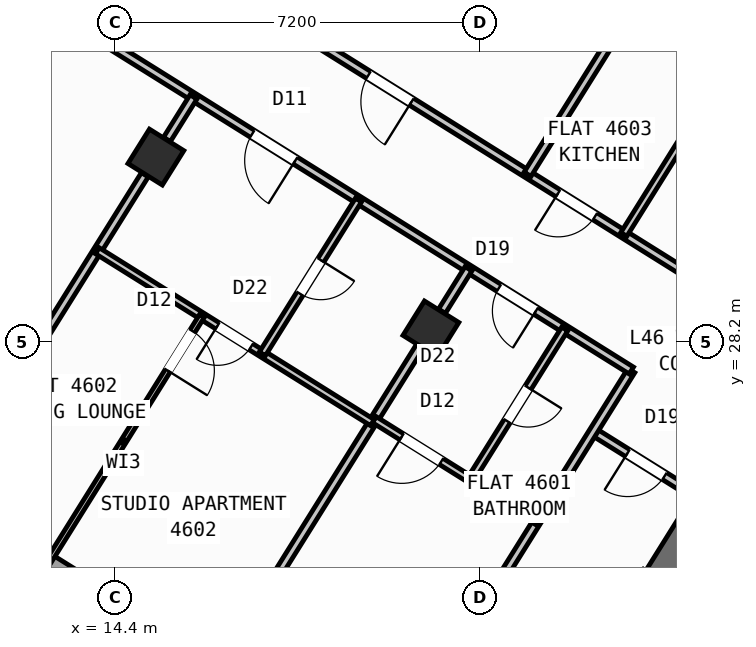
"""IFC4 building model, lengths in metres.
Left out: names, types, materials, properties, quantities, classifications, styles, units other than length and angle.
Written with IfcOpenShell. Run it as: python <this file> out.ifc"""

import sys

from ifc_helpers import new_model, si_unit, direction, frame, frame_2d, origin, origin_2d, place, context, subcontext, project, spatial, rectangle, hollow_rectangle, extrude, source, transform, mapped, element, fill, save


model = new_model("IFC4")
c1 = context("Model", 3, precision=1e-05, world=origin(), true_north=direction((0.0, 1.0)))
c2 = subcontext(c1, "Body", "Model", "MODEL_VIEW")
j1 = project(units=[si_unit("LENGTHUNIT", "METRE"), si_unit("PLANEANGLEUNIT", "RADIAN")], contexts=[c1])
p1 = place(None, origin())
s1 = spatial("IfcSite", under=j1, at=p1, CompositionType="ELEMENT")
p2 = place(p1, origin())
s2 = spatial("IfcBuilding", under=s1, at=p2, CompositionType="ELEMENT")
p3 = place(p2, frame((0.0, 0.0, 184.2)))
s3 = spatial("IfcBuildingStorey", under=s2, at=p3, CompositionType="ELEMENT", Elevation=184.2)
p4 = place(p3, frame((26.007, 24.976, 0.0), z_axis=(0.0, 0.0, 1.0), x_axis=(-0.529923795287, -0.848045264823, 0.0)))
e1 = element("IfcWall", 1, at=p4, inside=s3, PredefinedType="SHEAR", context=c2, shape_type="SweptSolid", body=[
    extrude(rectangle(XDim=6.425, YDim=0.55, at=frame_2d((3.212, 0.0))), origin(), (0.0, 0.0, 1.0), 3.35),
])
m1 = source(origin(), c2, "Body", "SweptSolid", [
    extrude(hollow_rectangle(XDim=0.8, YDim=0.8, WallThickness=0.032, at=origin_2d()), origin(), (0.0, 0.0, 1.0), 3.6),
])
for number, where, z_axis, x_axis in (
    (2, (20.632, 28.452, 0.0), (0.0, 0.0, 1.0), (-0.848, 0.53, 0.0)),
    (3, (15.205, 31.844, 0.0), (0.0, 0.0, 1.0), (-0.848, 0.53, 0.0)),
):
    element("IfcColumn", number, at=place(p3, frame(where, z_axis=z_axis, x_axis=x_axis)), inside=s3, PredefinedType="COLUMN", context=c2, shape_type="MappedRepresentation", body=[
        mapped(m1, transform((0.0, 0.0, 0.0), scale=1.0)),
    ])
p5 = place(p3, frame((31.76, 12.183, 0.0), z_axis=(0.0, 0.0, 1.0), x_axis=(-0.848047074256, 0.529920899612, 0.0)))
e4 = element("IfcWall", 4, at=p5, inside=s3, PredefinedType="STANDARD", context=c2, shape_type="SweptSolid", body=[
    extrude(rectangle(XDim=30.652, YDim=0.32, at=frame_2d((15.326, 0.0))), origin(), (0.0, 0.0, 1.0), 3.35),
])
p6 = place(p5, frame((15.166, 0.0, 0.0)))
e5 = element("IfcOpeningElement", 5, at=p6, cuts=e4, PredefinedType="OPENING", context=c2, shape_type="SweptSolid", body=[
    extrude(rectangle(XDim=1.2, YDim=2.15, at=frame_2d((0.6, 1.075))), frame((0.0, 0.17, 0.0), z_axis=(0.0, -1.0, 0.0), x_axis=(1.0, 0.0, 0.0)), (0.0, 0.0, 1.0), 0.34),
])
p7 = place(p5, frame((2.015, 0.0, 0.8)))
e6 = element("IfcOpeningElement", 6, at=p7, cuts=e4, PredefinedType="OPENING", context=c2, shape_type="SweptSolid", body=[
    extrude(rectangle(XDim=2.1, YDim=1.55, at=frame_2d((1.05, 0.775))), frame((0.0, 0.17, 0.0), z_axis=(0.0, -1.0, 0.0), x_axis=(1.0, 0.0, 0.0)), (0.0, 0.0, 1.0), 0.34),
])
p8 = place(p5, frame((7.244, 0.0, 0.8)))
e7 = element("IfcOpeningElement", 7, at=p8, cuts=e4, PredefinedType="OPENING", context=c2, shape_type="SweptSolid", body=[
    extrude(rectangle(XDim=2.1, YDim=1.55, at=frame_2d((1.05, 0.775))), frame((0.0, 0.17, 0.0), z_axis=(0.0, -1.0, 0.0), x_axis=(1.0, 0.0, 0.0)), (0.0, 0.0, 1.0), 0.34),
])
p9 = place(p5, frame((12.623, 0.0, 1.0)))
e8 = element("IfcOpeningElement", 8, at=p9, cuts=e4, PredefinedType="OPENING", context=c2, shape_type="SweptSolid", body=[
    extrude(rectangle(XDim=0.9, YDim=1.25, at=frame_2d((0.45, 0.625))), frame((0.0, 0.17, 0.0), z_axis=(0.0, -1.0, 0.0), x_axis=(1.0, 0.0, 0.0)), (0.0, 0.0, 1.0), 0.34),
])
p10 = place(p5, frame((19.565, 0.0, 0.95)))
e9 = element("IfcOpeningElement", 9, at=p10, cuts=e4, PredefinedType="OPENING", context=c2, shape_type="SweptSolid", body=[
    extrude(rectangle(XDim=1.2, YDim=1.4, at=frame_2d((0.6, 0.7))), frame((0.0, 0.17, 0.0), z_axis=(0.0, -1.0, 0.0), x_axis=(1.0, 0.0, 0.0)), (0.0, 0.0, 1.0), 0.34),
])
p11 = place(p5, frame((25.983, 0.0, 1.0)))
e10 = element("IfcOpeningElement", 10, at=p11, cuts=e4, PredefinedType="OPENING", context=c2, shape_type="SweptSolid", body=[
    extrude(rectangle(XDim=0.9, YDim=1.25, at=frame_2d((0.45, 0.625))), frame((0.0, 0.17, 0.0), z_axis=(0.0, -1.0, 0.0), x_axis=(1.0, 0.0, 0.0)), (0.0, 0.0, 1.0), 0.34),
])
p12 = place(p5, frame((28.433, 0.0, 1.0)))
e11 = element("IfcOpeningElement", 11, at=p12, cuts=e4, PredefinedType="OPENING", context=c2, shape_type="SweptSolid", body=[
    extrude(rectangle(XDim=0.9, YDim=1.25, at=frame_2d((0.45, 0.625))), frame((0.0, 0.17, 0.0), z_axis=(0.0, -1.0, 0.0), x_axis=(1.0, 0.0, 0.0)), (0.0, 0.0, 1.0), 0.34),
])
p13 = place(p3, frame((5.7, 28.71, 0.0), z_axis=(0.0, 0.0, 1.0), x_axis=(0.529923711467, 0.8480453172, 0.0)))
e12 = element("IfcWall", 12, at=p13, inside=s3, PredefinedType="STANDARD", context=c2, shape_type="SweptSolid", body=[
    extrude(rectangle(XDim=21.587, YDim=0.32, at=frame_2d((10.794, 0.0))), origin(), (0.0, 0.0, 1.0), 2.825),
])
p14 = place(p13, frame((1.44, 0.0, 0.95)))
e13 = element("IfcOpeningElement", 13, at=p14, cuts=e12, PredefinedType="OPENING", context=c2, shape_type="SweptSolid", body=[
    extrude(rectangle(XDim=1.2, YDim=1.4, at=frame_2d((0.6, 0.7))), frame((0.0, 0.17, 0.0), z_axis=(0.0, -1.0, 0.0), x_axis=(1.0, 0.0, 0.0)), (0.0, 0.0, 1.0), 0.34),
])
p15 = place(p13, frame((4.545, 0.0, 0.85)))
e14 = element("IfcOpeningElement", 14, at=p15, cuts=e12, PredefinedType="OPENING", context=c2, shape_type="SweptSolid", body=[
    extrude(rectangle(XDim=1.8, YDim=1.5, at=frame_2d((0.9, 0.75))), frame((0.0, 0.17, 0.0), z_axis=(0.0, -1.0, 0.0), x_axis=(1.0, 0.0, 0.0)), (0.0, 0.0, 1.0), 0.34),
])
p16 = place(p13, frame((12.139, 0.0, 1.0)))
e15 = element("IfcOpeningElement", 15, at=p16, cuts=e12, PredefinedType="OPENING", context=c2, shape_type="SweptSolid", body=[
    extrude(rectangle(XDim=0.9, YDim=1.25, at=frame_2d((0.45, 0.625))), frame((0.0, 0.17, 0.0), z_axis=(0.0, -1.0, 0.0), x_axis=(1.0, 0.0, 0.0)), (0.0, 0.0, 1.0), 0.34),
])
p17 = place(p13, frame((16.35, 0.0, 0.95)))
e16 = element("IfcOpeningElement", 16, at=p17, cuts=e12, PredefinedType="OPENING", context=c2, shape_type="SweptSolid", body=[
    extrude(rectangle(XDim=1.2, YDim=1.4, at=frame_2d((0.6, 0.7))), frame((0.0, 0.17, 0.0), z_axis=(0.0, -1.0, 0.0), x_axis=(1.0, 0.0, 0.0)), (0.0, 0.0, 1.0), 0.34),
])
p18 = place(p13, frame((18.762, 0.0, 0.95)))
e17 = element("IfcOpeningElement", 17, at=p18, cuts=e12, PredefinedType="OPENING", context=c2, shape_type="SweptSolid", body=[
    extrude(rectangle(XDim=1.2, YDim=1.4, at=frame_2d((0.6, 0.7))), frame((0.0, 0.17, 0.0), z_axis=(0.0, -1.0, 0.0), x_axis=(1.0, 0.0, 0.0)), (0.0, 0.0, 1.0), 0.34),
])
p19 = place(p3, frame((17.424, 47.083, 0.0), z_axis=(0.0, 0.0, 1.0), x_axis=(0.848049927979, -0.529916332693, 0.0)))
e18 = element("IfcWall", 18, at=p19, inside=s3, PredefinedType="STANDARD", context=c2, shape_type="SweptSolid", body=[
    extrude(rectangle(XDim=29.223, YDim=0.32, at=frame_2d((14.612, 0.0))), origin(), (0.0, 0.0, 1.0), 3.35),
])
p20 = place(p19, frame((3.764, 0.0, 0.0)))
e19 = element("IfcOpeningElement", 19, at=p20, cuts=e18, PredefinedType="OPENING", context=c2, shape_type="SweptSolid", body=[
    extrude(rectangle(XDim=1.05, YDim=2.15, at=frame_2d((0.525, 1.075))), frame((0.0, 0.17, 0.0), z_axis=(0.0, -1.0, 0.0), x_axis=(1.0, 0.0, 0.0)), (0.0, 0.0, 1.0), 0.34),
])
p21 = place(p19, frame((8.344, 0.0, 0.8)))
e20 = element("IfcOpeningElement", 20, at=p21, cuts=e18, PredefinedType="OPENING", context=c2, shape_type="SweptSolid", body=[
    extrude(rectangle(XDim=2.1, YDim=1.55, at=frame_2d((1.05, 0.775))), frame((0.0, 0.17, 0.0), z_axis=(0.0, -1.0, 0.0), x_axis=(1.0, 0.0, 0.0)), (0.0, 0.0, 1.0), 0.34),
])
p22 = place(p19, frame((13.589, 0.0, 0.85)))
e21 = element("IfcOpeningElement", 21, at=p22, cuts=e18, PredefinedType="OPENING", context=c2, shape_type="SweptSolid", body=[
    extrude(rectangle(XDim=1.8, YDim=1.5, at=frame_2d((0.9, 0.75))), frame((0.0, 0.17, 0.0), z_axis=(0.0, -1.0, 0.0), x_axis=(1.0, 0.0, 0.0)), (0.0, 0.0, 1.0), 0.34),
])
p23 = place(p19, frame((17.104, 0.0, 0.95)))
e22 = element("IfcOpeningElement", 22, at=p23, cuts=e18, PredefinedType="OPENING", context=c2, shape_type="SweptSolid", body=[
    extrude(rectangle(XDim=1.2, YDim=1.4, at=frame_2d((0.6, 0.7))), frame((0.0, 0.17, 0.0), z_axis=(0.0, -1.0, 0.0), x_axis=(1.0, 0.0, 0.0)), (0.0, 0.0, 1.0), 0.34),
])
p24 = place(p19, frame((21.214, 0.0, 0.95)))
e23 = element("IfcOpeningElement", 23, at=p24, cuts=e18, PredefinedType="OPENING", context=c2, shape_type="SweptSolid", body=[
    extrude(rectangle(XDim=1.2, YDim=1.4, at=frame_2d((0.6, 0.7))), frame((0.0, 0.17, 0.0), z_axis=(0.0, -1.0, 0.0), x_axis=(1.0, 0.0, 0.0)), (0.0, 0.0, 1.0), 0.34),
])
p25 = place(p19, frame((25.853, 0.0, 0.95)))
e24 = element("IfcOpeningElement", 24, at=p25, cuts=e18, PredefinedType="OPENING", context=c2, shape_type="SweptSolid", body=[
    extrude(rectangle(XDim=1.2, YDim=1.4, at=frame_2d((0.6, 0.7))), frame((0.0, 0.17, 0.0), z_axis=(0.0, -1.0, 0.0), x_axis=(1.0, 0.0, 0.0)), (0.0, 0.0, 1.0), 0.34),
])
p26 = place(p3, frame((26.049, 25.044, 0.0), z_axis=(0.0, 0.0, 1.0), x_axis=(-0.848050851465, 0.529914854792, 0.0)))
e25 = element("IfcWall", 25, at=p26, inside=s3, PredefinedType="PARTITIONING", context=c2, shape_type="SweptSolid", body=[
    extrude(rectangle(XDim=2.61, YDim=0.16, at=frame_2d((1.305, 0.0))), origin(), (0.0, 0.0, 1.0), 2.825),
])
p27 = place(p26, frame((0.95, 0.0, 0.0)))
e26 = element("IfcOpeningElement", 26, at=p27, cuts=e25, PredefinedType="OPENING", context=c2, shape_type="SweptSolid", body=[
    extrude(rectangle(XDim=0.86, YDim=2.05, at=frame_2d((0.43, 1.025))), frame((0.0, 0.09, 0.0), z_axis=(0.0, -1.0, 0.0), x_axis=(1.0, 0.0, 0.0)), (0.0, 0.0, 1.0), 0.18),
])
p28 = place(p3, frame((24.588, 27.631, 0.0), z_axis=(0.0, 0.0, 1.0), x_axis=(-0.529914992377, -0.848050765494, 0.0)))
e27 = element("IfcWall", 27, at=p28, inside=s3, PredefinedType="PARTITIONING", context=c2, shape_type="SweptSolid", body=[
    extrude(rectangle(XDim=9.15, YDim=0.16, at=frame_2d((4.575, 0.0))), origin(), (0.0, 0.0, 1.0), 3.34),
])
p29 = place(p3, frame((25.754, 29.497, 0.0), z_axis=(0.0, 0.0, 1.0), x_axis=(-0.848045850158, 0.529922858565, 0.0)))
e28 = element("IfcWall", 28, at=p29, inside=s3, PredefinedType="PARTITIONING", context=c2, shape_type="SweptSolid", body=[
    extrude(rectangle(XDim=16.73, YDim=0.16, at=frame_2d((8.365, 0.0))), origin(), (0.0, 0.0, 1.0), 3.34),
])
p30 = place(p29, frame((2.22, 0.0, 0.0)))
e29 = element("IfcOpeningElement", 29, at=p30, cuts=e28, PredefinedType="OPENING", context=c2, shape_type="SweptSolid", body=[
    extrude(rectangle(XDim=0.86, YDim=2.05, at=frame_2d((0.43, 1.025))), frame((0.0, 0.09, 0.0), z_axis=(0.0, -1.0, 0.0), x_axis=(1.0, 0.0, 0.0)), (0.0, 0.0, 1.0), 0.18),
])
p31 = place(p29, frame((6.49, 0.0, 0.0)))
e30 = element("IfcOpeningElement", 30, at=p31, cuts=e28, PredefinedType="OPENING", context=c2, shape_type="SweptSolid", body=[
    extrude(rectangle(XDim=1.0, YDim=2.1, at=frame_2d((0.5, 1.05))), frame((0.0, 0.09, 0.0), z_axis=(0.0, -1.0, 0.0), x_axis=(1.0, 0.0, 0.0)), (0.0, 0.0, 1.0), 0.18),
])
p32 = place(p29, frame((14.304, 0.0, 0.0)))
e31 = element("IfcOpeningElement", 31, at=p32, cuts=e28, PredefinedType="OPENING", context=c2, shape_type="SweptSolid", body=[
    extrude(rectangle(XDim=1.0, YDim=2.1, at=frame_2d((0.5, 1.05))), frame((0.0, 0.09, 0.0), z_axis=(0.0, -1.0, 0.0), x_axis=(1.0, 0.0, 0.0)), (0.0, 0.0, 1.0), 0.18),
])
p33 = place(p3, frame((24.588, 27.631, 0.0), z_axis=(0.0, 0.0, 1.0), x_axis=(-0.848041752158, 0.529929416617, 0.0)))
e32 = element("IfcWall", 32, at=p33, inside=s3, PredefinedType="PARTITIONING", context=c2, shape_type="SweptSolid", body=[
    extrude(rectangle(XDim=16.73, YDim=0.16, at=frame_2d((8.365, 0.0))), origin(), (0.0, 0.0, 1.0), 3.34),
])
p34 = place(p33, frame((2.22, 0.0, 0.0)))
e33 = element("IfcOpeningElement", 33, at=p34, cuts=e32, PredefinedType="OPENING", context=c2, shape_type="SweptSolid", body=[
    extrude(rectangle(XDim=0.86, YDim=2.05, at=frame_2d((0.43, 1.025))), frame((0.0, 0.09, 0.0), z_axis=(0.0, -1.0, 0.0), x_axis=(1.0, 0.0, 0.0)), (0.0, 0.0, 1.0), 0.18),
])
p35 = place(p33, frame((7.82, 0.0, 0.0)))
e34 = element("IfcOpeningElement", 34, at=p35, cuts=e32, PredefinedType="OPENING", context=c2, shape_type="SweptSolid", body=[
    extrude(rectangle(XDim=1.0, YDim=2.1, at=frame_2d((0.5, 1.05))), frame((0.0, 0.09, 0.0), z_axis=(0.0, -1.0, 0.0), x_axis=(1.0, 0.0, 0.0)), (0.0, 0.0, 1.0), 0.18),
])
p36 = place(p33, frame((12.95, 0.0, 0.0)))
e35 = element("IfcOpeningElement", 35, at=p36, cuts=e32, PredefinedType="OPENING", context=c2, shape_type="SweptSolid", body=[
    extrude(rectangle(XDim=1.0, YDim=2.1, at=frame_2d((0.5, 1.05))), frame((0.0, 0.09, 0.0), z_axis=(0.0, -1.0, 0.0), x_axis=(1.0, 0.0, 0.0)), (0.0, 0.0, 1.0), 0.18),
])
p37 = place(p3, frame((21.374, 29.639, 0.0), z_axis=(0.0, 0.0, 1.0), x_axis=(-0.529998940003, -0.847998304005, 0.0)))
e36 = element("IfcWall", 36, at=p37, inside=s3, PredefinedType="PARTITIONING", context=c2, shape_type="SweptSolid", body=[
    extrude(rectangle(XDim=0.988, YDim=0.16, at=frame_2d((0.494, 0.0))), origin(), (0.0, 0.0, 1.0), 2.825),
])
p38 = place(p3, frame((20.414, 28.103, 0.0), z_axis=(0.0, 0.0, 1.0), x_axis=(-0.529934553702, -0.848038542045, 0.0)))
e37 = element("IfcWall", 37, at=p38, inside=s3, PredefinedType="PARTITIONING", context=c2, shape_type="SweptSolid", body=[
    extrude(rectangle(XDim=6.476, YDim=0.16, at=frame_2d((3.238, 0.0))), origin(), (0.0, 0.0, 1.0), 2.825),
])
p39 = place(p3, frame((22.728, 24.654, 0.0), z_axis=(0.0, 0.0, 1.0), x_axis=(-0.848059820872, 0.529900500304, 0.0)))
e38 = element("IfcWall", 38, at=p39, inside=s3, PredefinedType="PLUMBINGWALL", context=c2, shape_type="SweptSolid", body=[
    extrude(rectangle(XDim=3.79, YDim=0.14, at=frame_2d((1.895, 0.0))), origin(), (0.0, 0.0, 1.0), 3.34),
])
p40 = place(p39, frame((2.23, 0.0, 0.0)))
e39 = element("IfcOpeningElement", 39, at=p40, cuts=e38, PredefinedType="OPENING", context=c2, shape_type="SweptSolid", body=[
    extrude(rectangle(XDim=0.92, YDim=2.08, at=frame_2d((0.46, 1.04))), frame((0.0, 0.08, 0.0), z_axis=(0.0, -1.0, 0.0), x_axis=(1.0, 0.0, 0.0)), (0.0, 0.0, 1.0), 0.16),
])
p41 = place(p3, frame((23.273, 28.452, 0.0), z_axis=(0.0, 0.0, 1.0), x_axis=(-0.529867639402, -0.848080352747, 0.0)))
e40 = element("IfcWall", 40, at=p41, inside=s3, PredefinedType="PLUMBINGWALL", context=c2, shape_type="SweptSolid", body=[
    extrude(rectangle(XDim=3.51, YDim=0.14, at=frame_2d((1.755, 0.0))), origin(), (0.0, 0.0, 1.0), 2.995),
])
p42 = place(p41, frame((1.365, 0.0, 0.0)))
e41 = element("IfcOpeningElement", 41, at=p42, cuts=e40, PredefinedType="OPENING", context=c2, shape_type="SweptSolid", body=[
    extrude(rectangle(XDim=0.78, YDim=2.05, at=frame_2d((0.39, 1.025))), frame((0.0, 0.08, 0.0), z_axis=(0.0, -1.0, 0.0), x_axis=(1.0, 0.0, 0.0)), (0.0, 0.0, 1.0), 0.16),
])
p43 = place(p3, frame((15.946, 33.031, 0.0), z_axis=(0.0, 0.0, 1.0), x_axis=(-0.529821225456, -0.848109349704, 0.0)))
e42 = element("IfcWall", 42, at=p43, inside=s3, PredefinedType="PARTITIONING", context=c2, shape_type="SweptSolid", body=[
    extrude(rectangle(XDim=0.988, YDim=0.16, at=frame_2d((0.494, 0.0))), origin(), (0.0, 0.0, 1.0), 2.825),
])
p44 = place(p3, frame((14.986, 31.494, 0.0), z_axis=(0.0, 0.0, 1.0), x_axis=(-0.529907440938, -0.848055484057, 0.0)))
e43 = element("IfcWall", 43, at=p44, inside=s3, PredefinedType="PARTITIONING", context=c2, shape_type="SweptSolid", body=[
    extrude(rectangle(XDim=6.476, YDim=0.16, at=frame_2d((3.238, 0.0))), origin(), (0.0, 0.0, 1.0), 2.825),
])
p45 = place(p3, frame((19.477, 26.603, 0.0), z_axis=(0.0, 0.0, 1.0), x_axis=(-0.848039019877, 0.529933789039, 0.0)))
e44 = element("IfcWall", 44, at=p45, inside=s3, PredefinedType="PLUMBINGWALL", context=c2, shape_type="SweptSolid", body=[
    extrude(rectangle(XDim=6.4, YDim=0.14, at=frame_2d((3.2, 0.0))), origin(), (0.0, 0.0, 1.0), 3.34),
])
p46 = place(p45, frame((2.824, 0.0, 0.0)))
e45 = element("IfcOpeningElement", 45, at=p46, cuts=e44, PredefinedType="OPENING", context=c2, shape_type="SweptSolid", body=[
    extrude(rectangle(XDim=0.78, YDim=2.05, at=frame_2d((0.39, 1.025))), frame((0.0, 0.08, 0.0), z_axis=(0.0, -1.0, 0.0), x_axis=(1.0, 0.0, 0.0)), (0.0, 0.0, 1.0), 0.16),
])
p47 = place(p3, frame((19.203, 30.996, 0.0), z_axis=(0.0, 0.0, 1.0), x_axis=(-0.529906983049, -0.848055770169, 0.0)))
e46 = element("IfcWall", 46, at=p47, inside=s3, PredefinedType="PLUMBINGWALL", context=c2, shape_type="SweptSolid", body=[
    extrude(rectangle(XDim=3.58, YDim=0.14, at=frame_2d((1.79, 0.0))), origin(), (0.0, 0.0, 1.0), 3.34),
])
p48 = place(p47, frame((1.4, 0.0, 0.0)))
e47 = element("IfcOpeningElement", 47, at=p48, cuts=e46, PredefinedType="OPENING", context=c2, shape_type="SweptSolid", body=[
    extrude(rectangle(XDim=0.78, YDim=2.05, at=frame_2d((0.39, 1.025))), frame((0.0, 0.08, 0.0), z_axis=(0.0, -1.0, 0.0), x_axis=(1.0, 0.0, 0.0)), (0.0, 0.0, 1.0), 0.16),
])
p49 = place(p3, frame((16.112, 28.706, 0.0), z_axis=(0.0, 0.0, 1.0), x_axis=(-0.529916267533, -0.848049968695, 0.0)))
e48 = element("IfcWall", 48, at=p49, inside=s3, PredefinedType="PARTITIONING", context=c2, shape_type="SweptSolid", body=[
    extrude(rectangle(XDim=5.84, YDim=0.11, at=frame_2d((2.92, 0.0))), origin(), (0.0, 0.0, 1.0), 3.34),
])
p50 = place(p49, frame((0.35, 0.0, 0.0)))
e49 = element("IfcOpeningElement", 49, at=p50, cuts=e48, PredefinedType="OPENING", context=c2, shape_type="SweptSolid", body=[
    extrude(rectangle(XDim=0.92, YDim=2.08, at=frame_2d((0.46, 1.04))), frame((0.0, 0.065, 0.0), z_axis=(0.0, -1.0, 0.0), x_axis=(1.0, 0.0, 0.0)), (0.0, 0.0, 1.0), 0.13),
])
p51 = place(p3, frame((24.282, 34.293, 0.0), z_axis=(0.0, 0.0, 1.0), x_axis=(-0.529938869374, -0.84803584519, 0.0)))
e50 = element("IfcWall", 50, at=p51, inside=s3, PredefinedType="PARTITIONING", context=c2, shape_type="SweptSolid", body=[
    extrude(rectangle(XDim=3.288, YDim=0.16, at=frame_2d((1.644, 0.0))), origin(), (0.0, 0.0, 1.0), 2.825),
])
p52 = place(p3, frame((27.359, 34.991, 0.0), z_axis=(0.0, 0.0, 1.0), x_axis=(-0.529907329021, -0.848055553988, 0.0)))
e51 = element("IfcWall", 51, at=p52, inside=s3, PredefinedType="PLUMBINGWALL", context=c2, shape_type="SweptSolid", body=[
    extrude(rectangle(XDim=5.51, YDim=0.14, at=frame_2d((2.755, 0.0))), origin(), (0.0, 0.0, 1.0), 2.995),
])
p53 = place(p52, frame((2.365, 0.0, 0.0)))
e52 = element("IfcOpeningElement", 52, at=p53, cuts=e51, PredefinedType="OPENING", context=c2, shape_type="SweptSolid", body=[
    extrude(rectangle(XDim=0.78, YDim=2.05, at=frame_2d((0.39, 1.025))), frame((0.0, 0.08, 0.0), z_axis=(0.0, -1.0, 0.0), x_axis=(1.0, 0.0, 0.0)), (0.0, 0.0, 1.0), 0.16),
])
m2 = source(origin(), c2, "Body", "SweptSolid", [
    extrude(rectangle(XDim=0.86, YDim=2.05, at=frame_2d((0.43, 1.025))), frame((0.0, 0.025, 0.0), z_axis=(0.0, -1.0, 0.0), x_axis=(1.0, 0.0, 0.0)), (0.0, 0.0, 1.0), 0.05),
])
p54 = place(p27, origin())
e53 = element("IfcDoor", 53, at=p54, inside=s3, OperationType="SINGLE_SWING_RIGHT", PredefinedType="DOOR", context=c2, shape_type="MappedRepresentation", body=[
    mapped(m2, transform((0.0, 0.0, 0.0), scale=1.0)),
])
fill(e26, e53)
p55 = place(p34, origin())
e54 = element("IfcDoor", 54, at=p55, inside=s3, OperationType="SINGLE_SWING_LEFT", PredefinedType="DOOR", context=c2, shape_type="MappedRepresentation", body=[
    mapped(m2, transform((0.0, 0.0, 0.0), scale=1.0)),
])
fill(e33, e54)
m3 = source(origin(), c2, "Body", "SweptSolid", [
    extrude(rectangle(XDim=0.92, YDim=2.08, at=frame_2d((0.46, 1.04))), frame((0.0, 0.025, 0.0), z_axis=(0.0, -1.0, 0.0), x_axis=(1.0, 0.0, 0.0)), (0.0, 0.0, 1.0), 0.05),
])
p56 = place(p40, origin())
e55 = element("IfcDoor", 55, at=p56, inside=s3, OperationType="SINGLE_SWING_RIGHT", PredefinedType="DOOR", context=c2, shape_type="MappedRepresentation", body=[
    mapped(m3, transform((0.0, 0.0, 0.0), scale=1.0)),
])
fill(e39, e55)
m4 = source(origin(), c2, "Body", "SweptSolid", [
    extrude(rectangle(XDim=0.78, YDim=2.05, at=frame_2d((0.39, 1.025))), frame((0.0, 0.025, 0.0), z_axis=(0.0, -1.0, 0.0), x_axis=(1.0, 0.0, 0.0)), (0.0, 0.0, 1.0), 0.05),
])
p57 = place(p42, origin())
e56 = element("IfcDoor", 56, at=p57, inside=s3, OperationType="SINGLE_SWING_LEFT", PredefinedType="DOOR", context=c2, shape_type="MappedRepresentation", body=[
    mapped(m4, transform((0.0, 0.0, 0.0), scale=1.0)),
])
fill(e41, e56)
p58 = place(p50, origin())
e57 = element("IfcDoor", 57, at=p58, inside=s3, OperationType="SINGLE_SWING_RIGHT", PredefinedType="DOOR", context=c2, shape_type="MappedRepresentation", body=[
    mapped(m3, transform((0.0, 0.0, 0.0), scale=1.0)),
])
fill(e49, e57)
m5 = source(origin(), c2, "Body", "SweptSolid", [
    extrude(rectangle(XDim=1.0, YDim=2.1, at=frame_2d((0.5, 1.05))), frame((0.0, 0.025, 0.0), z_axis=(0.0, -1.0, 0.0), x_axis=(1.0, 0.0, 0.0)), (0.0, 0.0, 1.0), 0.05),
])
p59 = place(p35, origin())
e58 = element("IfcDoor", 58, at=p59, inside=s3, OperationType="SINGLE_SWING_LEFT", PredefinedType="DOOR", context=c2, shape_type="MappedRepresentation", body=[
    mapped(m5, transform((0.0, 0.0, 0.0), scale=1.0)),
])
fill(e34, e58)
p60 = place(p46, origin())
e59 = element("IfcDoor", 59, at=p60, inside=s3, OperationType="SINGLE_SWING_RIGHT", PredefinedType="DOOR", context=c2, shape_type="MappedRepresentation", body=[
    mapped(m4, transform((0.0, 0.0, 0.0), scale=1.0)),
])
fill(e45, e59)
p61 = place(p48, origin())
e60 = element("IfcDoor", 60, at=p61, inside=s3, OperationType="SINGLE_SWING_LEFT", PredefinedType="DOOR", context=c2, shape_type="MappedRepresentation", body=[
    mapped(m4, transform((0.0, 0.0, 0.0), scale=1.0)),
])
fill(e47, e60)
p62 = place(p30, origin())
e61 = element("IfcDoor", 61, at=p62, inside=s3, OperationType="SINGLE_SWING_RIGHT", PredefinedType="DOOR", context=c2, shape_type="MappedRepresentation", body=[
    mapped(m2, transform((0.0, 0.0, 0.0), scale=1.0)),
])
fill(e29, e61)
p63 = place(p31, origin())
e62 = element("IfcDoor", 62, at=p63, inside=s3, OperationType="SINGLE_SWING_LEFT", PredefinedType="DOOR", context=c2, shape_type="MappedRepresentation", body=[
    mapped(m5, transform((0.0, 0.0, 0.0), scale=1.0)),
])
fill(e30, e62)
save(model, sys.argv[1])
